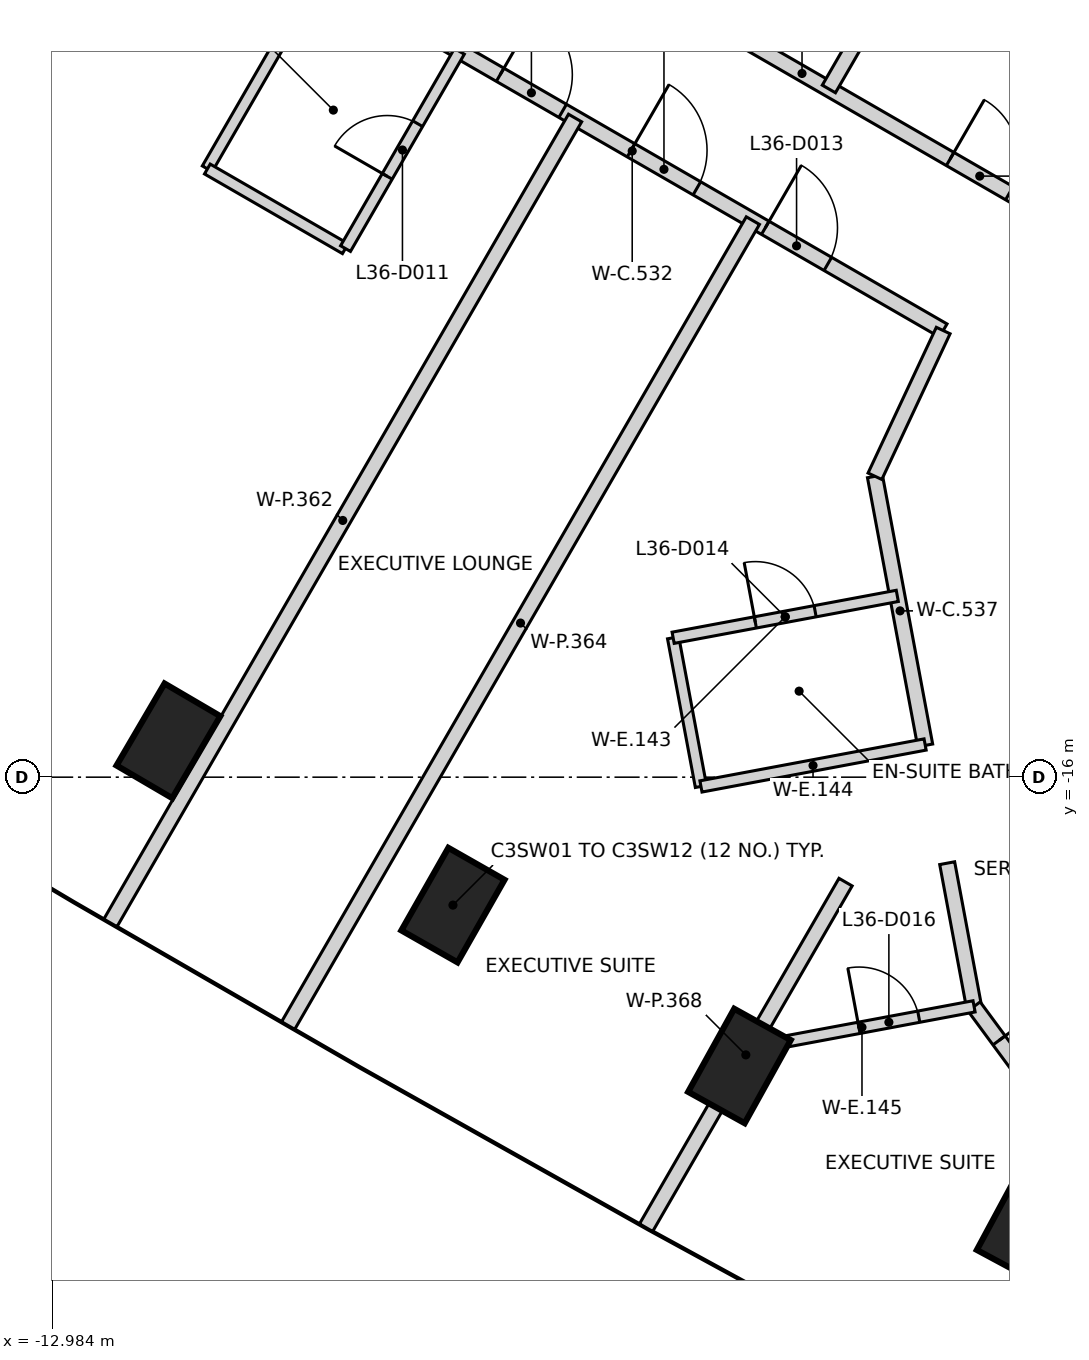
"""IFC4 building model, lengths in metres.
Left out: names, types, materials, properties, quantities, classifications, styles, units other than length and angle.
Written with IfcOpenShell. Run it as: python <this file> out.ifc"""

import sys

from ifc_helpers import new_model, si_unit, direction, frame, frame_2d, origin, origin_2d, place, context, subcontext, project, spatial, rectangle, extrude, element, fill, save


model = new_model("IFC4")
c1 = context("Model", 3, precision=1e-05, world=origin(), true_north=direction((0.0, 1.0)))
c2 = subcontext(c1, "Body", "Model", "MODEL_VIEW")
j1 = project(units=[si_unit("LENGTHUNIT", "METRE"), si_unit("PLANEANGLEUNIT", "RADIAN")], contexts=[c1])
p1 = place(None, origin())
s1 = spatial("IfcSite", under=j1, at=p1, CompositionType="ELEMENT")
p2 = place(p1, origin())
s2 = spatial("IfcBuilding", under=s1, at=p2, CompositionType="ELEMENT")
p3 = place(p2, frame((0.0, 0.0, 146.8)))
s3 = spatial("IfcBuildingStorey", under=s2, at=p3, CompositionType="ELEMENT", Elevation=146.8)
for number, where, z_axis, x_axis in (
    (1, (-11.457, -15.522, -0.4), (0.0, 0.0, 1.0), (0.505, 0.863, 0.0)),
    (2, (-7.714, -17.683, -0.4), (0.0, 0.0, 1.0), (0.495, 0.869, 0.0)),
    (3, (-3.945, -19.8, -0.4), (0.0, 0.0, 1.0), (0.485, 0.875, 0.0)),
    (4, (-0.151, -21.871, -0.4), (0.0, 0.0, 1.0), (0.474, 0.881, 0.0)),
):
    element("IfcColumn", number, at=place(p3, frame(where, z_axis=z_axis, x_axis=x_axis)), inside=s3, PredefinedType="COLUMN", context=c2, shape_type="SweptSolid", body=[
        extrude(rectangle(XDim=1.25, YDim=0.85, at=origin_2d()), origin(), (0.0, 0.0, 1.0), 3.6),
    ])
p4 = place(p3, frame((-9.447, -5.4, 0.0), z_axis=(0.0, 0.0, 1.0), x_axis=(0.866101262146, -0.49986858644, 0.0)))
e5 = element("IfcWall", 5, at=p4, inside=s3, PredefinedType="PARTITIONING", context=c2, shape_type="SweptSolid", body=[
    extrude(rectangle(XDim=9.449, YDim=0.2, at=frame_2d((4.724, 0.0))), origin(), (0.0, 0.0, 1.0), 3.2),
])
p5 = place(p4, frame((2.718, 0.0, 0.0)))
e6 = element("IfcOpeningElement", 6, at=p5, cuts=e5, PredefinedType="OPENING", context=c2, shape_type="SweptSolid", body=[
    extrude(rectangle(XDim=0.95, YDim=2.1, at=frame_2d((0.475, 1.05))), frame((0.0, 0.11, 0.0), z_axis=(0.0, -1.0, 0.0), x_axis=(1.0, 0.0, 0.0)), (0.0, 0.0, 1.0), 0.22),
])
p6 = place(p4, frame((4.707, 0.0, 0.0)))
e7 = element("IfcOpeningElement", 7, at=p6, cuts=e5, PredefinedType="OPENING", context=c2, shape_type="SweptSolid", body=[
    extrude(rectangle(XDim=1.0, YDim=2.1, at=frame_2d((0.5, 1.05))), frame((0.0, 0.11, 0.0), z_axis=(0.0, -1.0, 0.0), x_axis=(1.0, 0.0, 0.0)), (0.0, 0.0, 1.0), 0.22),
])
p7 = place(p4, frame((6.746, 0.0, 0.0)))
e8 = element("IfcOpeningElement", 8, at=p7, cuts=e5, PredefinedType="OPENING", context=c2, shape_type="SweptSolid", body=[
    extrude(rectangle(XDim=0.95, YDim=2.1, at=frame_2d((0.475, 1.05))), frame((0.0, 0.11, 0.0), z_axis=(0.0, -1.0, 0.0), x_axis=(1.0, 0.0, 0.0)), (0.0, 0.0, 1.0), 0.22),
])
p8 = place(p3, frame((-7.455, -4.24, 0.0), z_axis=(0.0, 0.0, 1.0), x_axis=(0.866015783746, -0.500016662025, 0.0)))
e9 = element("IfcWall", 9, at=p8, inside=s3, PredefinedType="PARTITIONING", context=c2, shape_type="SweptSolid", body=[
    extrude(rectangle(XDim=10.009, YDim=0.2, at=frame_2d((5.004, 0.0))), origin(), (0.0, 0.0, 1.0), 3.2),
])
p9 = place(p8, frame((2.262, 0.0, 0.0)))
e10 = element("IfcOpeningElement", 10, at=p9, cuts=e9, PredefinedType="OPENING", context=c2, shape_type="SweptSolid", body=[
    extrude(rectangle(XDim=0.9, YDim=2.1, at=frame_2d((0.45, 1.05))), frame((0.0, 0.11, 0.0), z_axis=(0.0, -1.0, 0.0), x_axis=(1.0, 0.0, 0.0)), (0.0, 0.0, 1.0), 0.22),
])
p10 = place(p8, frame((7.254, 0.0, 0.0)))
e11 = element("IfcOpeningElement", 11, at=p10, cuts=e9, PredefinedType="OPENING", context=c2, shape_type="SweptSolid", body=[
    extrude(rectangle(XDim=0.9, YDim=2.1, at=frame_2d((0.45, 1.05))), frame((0.0, 0.11, 0.0), z_axis=(0.0, -1.0, 0.0), x_axis=(1.0, 0.0, 0.0)), (0.0, 0.0, 1.0), 0.22),
])
p11 = place(p3, frame((-2.162, -12.042, 0.0), z_axis=(0.0, 0.0, 1.0), x_axis=(0.183572226488, -0.983006224631, 0.0)))
e12 = element("IfcWall", 12, at=p11, inside=s3, PredefinedType="PARTITIONING", context=c2, shape_type="SweptSolid", body=[
    extrude(rectangle(XDim=3.602, YDim=0.2, at=frame_2d((1.801, 0.0))), origin(), (0.0, 0.0, 1.0), 3.2),
])
p12 = place(p3, frame((-2.162, -12.041, 0.0), z_axis=(0.0, 0.0, 1.0), x_axis=(0.424280226728, 0.905530943264, 0.0)))
e13 = element("IfcWall", 13, at=p12, inside=s3, PredefinedType="PARTITIONING", context=c2, shape_type="SweptSolid", body=[
    extrude(rectangle(XDim=2.117, YDim=0.2, at=frame_2d((1.059, 0.0))), origin(), (0.0, 0.0, 1.0), 3.2),
])
p13 = place(p3, frame((-1.212, -17.131, 0.0), z_axis=(0.0, 0.0, 1.0), x_axis=(0.183680924698, -0.982985919483, 0.0)))
e14 = element("IfcWall", 14, at=p13, inside=s3, PredefinedType="PARTITIONING", context=c2, shape_type="SweptSolid", body=[
    extrude(rectangle(XDim=1.917, YDim=0.2, at=frame_2d((0.958, 0.0))), origin(), (0.0, 0.0, 1.0), 3.2),
])
p14 = place(p3, frame((-0.858, -19.016, 0.0), z_axis=(0.0, 0.0, 1.0), x_axis=(0.593123867414, -0.805111220829, 0.0)))
e15 = element("IfcWall", 15, at=p14, inside=s3, PredefinedType="PARTITIONING", context=c2, shape_type="SweptSolid", body=[
    extrude(rectangle(XDim=2.77, YDim=0.2, at=frame_2d((1.385, 0.0))), origin(), (0.0, 0.0, 1.0), 3.2),
])
p15 = place(p14, frame((0.555, 0.0, 0.0)))
e16 = element("IfcOpeningElement", 16, at=p15, cuts=e15, PredefinedType="OPENING", context=c2, shape_type="SweptSolid", body=[
    extrude(rectangle(XDim=0.95, YDim=2.1, at=frame_2d((0.475, 1.05))), frame((0.0, 0.11, 0.0), z_axis=(0.0, -1.0, 0.0), x_axis=(1.0, 0.0, 0.0)), (0.0, 0.0, 1.0), 0.22),
])
p16 = place(p3, frame((-12.22, -17.917, 0.0), z_axis=(0.0, 0.0, 1.0), x_axis=(0.499963860175, 0.866046268117, 0.0)))
e17 = element("IfcWall", 17, at=p16, inside=s3, PredefinedType="PARTITIONING", context=c2, shape_type="SweptSolid", body=[
    extrude(rectangle(XDim=12.227, YDim=0.2, at=frame_2d((6.114, 0.0))), origin(), (0.0, 0.0, 1.0), 2.3),
])
p17 = place(p3, frame((-9.882, -19.267, 0.0), z_axis=(0.0, 0.0, 1.0), x_axis=(0.499993811829, 0.866028976497, 0.0)))
e18 = element("IfcWall", 18, at=p17, inside=s3, PredefinedType="PARTITIONING", context=c2, shape_type="SweptSolid", body=[
    extrude(rectangle(XDim=12.227, YDim=0.2, at=frame_2d((6.114, 0.0))), origin(), (0.0, 0.0, 1.0), 2.3),
])
p18 = place(p3, frame((-6.155, -1.989, 0.0), z_axis=(0.0, 0.0, 1.0), x_axis=(0.866009062299, -0.500028303215, 0.0)))
e19 = element("IfcWall", 19, at=p18, inside=s3, PredefinedType="PARTITIONING", context=c2, shape_type="SweptSolid", body=[
    extrude(rectangle(XDim=10.802, YDim=0.2, at=frame_2d((5.401, 0.0))), origin(), (0.0, 0.0, 1.0), 2.3),
])
p19 = place(p3, frame((-5.173, -21.926, 0.0), z_axis=(0.0, 0.0, 1.0), x_axis=(0.499941227542, 0.86605933342, 0.0)))
e20 = element("IfcWall", 20, at=p19, inside=s3, PredefinedType="PARTITIONING", context=c2, shape_type="SweptSolid", body=[
    extrude(rectangle(XDim=5.249, YDim=0.2, at=frame_2d((2.625, 0.0))), origin(), (0.0, 0.0, 1.0), 3.2),
])
p20 = place(p3, frame((-2.768, -6.946, 0.0), z_axis=(0.0, 0.0, 1.0), x_axis=(0.500017832597, 0.866015107885, 0.0)))
e21 = element("IfcWall", 21, at=p20, inside=s3, PredefinedType="PARTITIONING", context=c2, shape_type="SweptSolid", body=[
    extrude(rectangle(XDim=2.6, YDim=0.2, at=frame_2d((1.3, 0.0))), origin(), (0.0, 0.0, 1.0), 2.3),
])
p21 = place(p3, frame((-0.425, -24.505, 0.0), z_axis=(0.0, 0.0, 1.0), x_axis=(0.499915194772, 0.86607436057, 0.0)))
e22 = element("IfcWall", 22, at=p21, inside=s3, PredefinedType="PARTITIONING", context=c2, shape_type="SweptSolid", body=[
    extrude(rectangle(XDim=2.997, YDim=0.2, at=frame_2d((1.499, 0.0))), origin(), (0.0, 0.0, 1.0), 2.3),
])
p22 = place(p3, frame((-10.946, -7.996, 0.0), z_axis=(0.0, 0.0, 1.0), x_axis=(0.500027927039, 0.866009279501, 0.0)))
e23 = element("IfcWall", 23, at=p22, inside=s3, PredefinedType="PARTITIONING", context=c2, shape_type="SweptSolid", body=[
    extrude(rectangle(XDim=2.998, YDim=0.15, at=frame_2d((1.499, 0.0))), origin(), (0.0, 0.0, 1.0), 3.2),
])
p23 = place(p3, frame((-10.945, -7.999, 0.0), z_axis=(0.0, 0.0, 1.0), x_axis=(0.866005190944, -0.500035008033, 0.0)))
e24 = element("IfcWall", 24, at=p23, inside=s3, PredefinedType="PARTITIONING", context=c2, shape_type="SweptSolid", body=[
    extrude(rectangle(XDim=2.096, YDim=0.15, at=frame_2d((1.048, 0.0))), origin(), (0.0, 0.0, 1.0), 3.2),
])
p24 = place(p3, frame((-9.127, -9.046, 0.0), z_axis=(0.0, 0.0, 1.0), x_axis=(0.499959910729, 0.866048548099, 0.0)))
e25 = element("IfcWall", 25, at=p24, inside=s3, PredefinedType="PARTITIONING", context=c2, shape_type="SweptSolid", body=[
    extrude(rectangle(XDim=2.996, YDim=0.15, at=frame_2d((1.498, 0.0))), origin(), (0.0, 0.0, 1.0), 3.2),
])
p25 = place(p24, frame((1.098, 0.0, 0.0)))
e26 = element("IfcOpeningElement", 26, at=p25, cuts=e25, PredefinedType="OPENING", context=c2, shape_type="SweptSolid", body=[
    extrude(rectangle(XDim=0.8, YDim=2.1, at=frame_2d((0.4, 1.05))), frame((0.0, 0.085, 0.0), z_axis=(0.0, -1.0, 0.0), x_axis=(1.0, 0.0, 0.0)), (0.0, 0.0, 1.0), 0.17),
])
p26 = place(p3, frame((-4.817, -14.166, 0.0), z_axis=(0.0, 0.0, 1.0), x_axis=(0.183903339385, -0.982944332993, 0.0)))
e27 = element("IfcWall", 27, at=p26, inside=s3, PredefinedType="PARTITIONING", context=c2, shape_type="SweptSolid", body=[
    extrude(rectangle(XDim=1.99, YDim=0.15, at=frame_2d((0.995, 0.0))), origin(), (0.0, 0.0, 1.0), 3.2),
])
p27 = place(p3, frame((-4.817, -14.166, 0.0), z_axis=(0.0, 0.0, 1.0), x_axis=(0.982987155193, 0.183674311555, 0.0)))
e28 = element("IfcWall", 28, at=p27, inside=s3, PredefinedType="PARTITIONING", context=c2, shape_type="SweptSolid", body=[
    extrude(rectangle(XDim=3.0, YDim=0.15, at=frame_2d((1.5, 0.0))), origin(), (0.0, 0.0, 1.0), 3.2),
])
p28 = place(p27, frame((1.1, 0.0, 0.0)))
e29 = element("IfcOpeningElement", 29, at=p28, cuts=e28, PredefinedType="OPENING", context=c2, shape_type="SweptSolid", body=[
    extrude(rectangle(XDim=0.8, YDim=2.1, at=frame_2d((0.4, 1.05))), frame((0.0, 0.085, 0.0), z_axis=(0.0, -1.0, 0.0), x_axis=(1.0, 0.0, 0.0)), (0.0, 0.0, 1.0), 0.17),
])
p29 = place(p3, frame((-4.451, -16.122, 0.0), z_axis=(0.0, 0.0, 1.0), x_axis=(0.982928336035, 0.18398882091, 0.0)))
e30 = element("IfcWall", 30, at=p29, inside=s3, PredefinedType="PARTITIONING", context=c2, shape_type="SweptSolid", body=[
    extrude(rectangle(XDim=3.0, YDim=0.15, at=frame_2d((1.5, 0.0))), origin(), (0.0, 0.0, 1.0), 3.2),
])
p30 = place(p3, frame((-3.807, -19.566, 0.0), z_axis=(0.0, 0.0, 1.0), x_axis=(0.982987155193, 0.183674311555, 0.0)))
e31 = element("IfcWall", 31, at=p30, inside=s3, PredefinedType="PARTITIONING", context=c2, shape_type="SweptSolid", body=[
    extrude(rectangle(XDim=3.0, YDim=0.15, at=frame_2d((1.5, 0.0))), origin(), (0.0, 0.0, 1.0), 3.2),
])
p31 = place(p30, frame((1.46, 0.0, 0.0)))
e32 = element("IfcOpeningElement", 32, at=p31, cuts=e31, PredefinedType="OPENING", context=c2, shape_type="SweptSolid", body=[
    extrude(rectangle(XDim=0.8, YDim=2.1, at=frame_2d((0.4, 1.05))), frame((0.0, 0.085, 0.0), z_axis=(0.0, -1.0, 0.0), x_axis=(1.0, 0.0, 0.0)), (0.0, 0.0, 1.0), 0.17),
])
p32 = place(p5, frame((0.95, 0.0, 0.0), z_axis=(0.0, 0.0, 1.0), x_axis=(-1.0, 0.0, 0.0)))
e33 = element("IfcDoor", 33, at=p32, inside=s3, OperationType="SINGLE_SWING_LEFT", PredefinedType="DOOR", context=c2, shape_type="SweptSolid", body=[
    extrude(rectangle(XDim=0.95, YDim=2.1, at=frame_2d((0.475, 1.05))), frame((0.0, 0.025, 0.0), z_axis=(0.0, -1.0, 0.0), x_axis=(1.0, 0.0, 0.0)), (0.0, 0.0, 1.0), 0.05),
])
fill(e6, e33)
p33 = place(p25, origin())
e34 = element("IfcDoor", 34, at=p33, inside=s3, OperationType="SINGLE_SWING_LEFT", PredefinedType="DOOR", context=c2, shape_type="SweptSolid", body=[
    extrude(rectangle(XDim=0.8, YDim=2.1, at=frame_2d((0.4, 1.05))), frame((0.0, 0.025, 0.0), z_axis=(0.0, -1.0, 0.0), x_axis=(1.0, 0.0, 0.0)), (0.0, 0.0, 1.0), 0.05),
])
fill(e26, e34)
p34 = place(p6, frame((1.0, 0.0, 0.0), z_axis=(0.0, 0.0, 1.0), x_axis=(-1.0, 0.0, 0.0)))
e35 = element("IfcDoor", 35, at=p34, inside=s3, OperationType="SINGLE_SWING_LEFT", PredefinedType="DOOR", context=c2, shape_type="SweptSolid", body=[
    extrude(rectangle(XDim=1.0, YDim=2.1, at=frame_2d((0.5, 1.05))), frame((0.0, 0.025, 0.0), z_axis=(0.0, -1.0, 0.0), x_axis=(1.0, 0.0, 0.0)), (0.0, 0.0, 1.0), 0.05),
])
fill(e7, e35)
p35 = place(p7, frame((0.95, 0.0, 0.0), z_axis=(0.0, 0.0, 1.0), x_axis=(-1.0, 0.0, 0.0)))
e36 = element("IfcDoor", 36, at=p35, inside=s3, OperationType="SINGLE_SWING_LEFT", PredefinedType="DOOR", context=c2, shape_type="SweptSolid", body=[
    extrude(rectangle(XDim=0.95, YDim=2.1, at=frame_2d((0.475, 1.05))), frame((0.0, 0.025, 0.0), z_axis=(0.0, -1.0, 0.0), x_axis=(1.0, 0.0, 0.0)), (0.0, 0.0, 1.0), 0.05),
])
fill(e8, e36)
p36 = place(p28, frame((0.8, 0.0, 0.0), z_axis=(0.0, 0.0, 1.0), x_axis=(-1.0, 0.0, 0.0)))
e37 = element("IfcDoor", 37, at=p36, inside=s3, OperationType="SINGLE_SWING_LEFT", PredefinedType="DOOR", context=c2, shape_type="SweptSolid", body=[
    extrude(rectangle(XDim=0.8, YDim=2.1, at=frame_2d((0.4, 1.05))), frame((0.0, 0.025, 0.0), z_axis=(0.0, -1.0, 0.0), x_axis=(1.0, 0.0, 0.0)), (0.0, 0.0, 1.0), 0.05),
])
fill(e29, e37)
p37 = place(p15, frame((0.95, 0.0, 0.0), z_axis=(0.0, 0.0, 1.0), x_axis=(-1.0, 0.0, 0.0)))
e38 = element("IfcDoor", 38, at=p37, inside=s3, OperationType="SINGLE_SWING_LEFT", PredefinedType="DOOR", context=c2, shape_type="SweptSolid", body=[
    extrude(rectangle(XDim=0.95, YDim=2.1, at=frame_2d((0.475, 1.05))), frame((0.0, 0.025, 0.0), z_axis=(0.0, -1.0, 0.0), x_axis=(1.0, 0.0, 0.0)), (0.0, 0.0, 1.0), 0.05),
])
fill(e16, e38)
p38 = place(p31, frame((0.8, 0.0, 0.0), z_axis=(0.0, 0.0, 1.0), x_axis=(-1.0, 0.0, 0.0)))
e39 = element("IfcDoor", 39, at=p38, inside=s3, OperationType="SINGLE_SWING_LEFT", PredefinedType="DOOR", context=c2, shape_type="SweptSolid", body=[
    extrude(rectangle(XDim=0.8, YDim=2.1, at=frame_2d((0.4, 1.05))), frame((0.0, 0.025, 0.0), z_axis=(0.0, -1.0, 0.0), x_axis=(1.0, 0.0, 0.0)), (0.0, 0.0, 1.0), 0.05),
])
fill(e32, e39)
p39 = place(p10, origin())
e40 = element("IfcDoor", 40, at=p39, inside=s3, OperationType="SINGLE_SWING_LEFT", PredefinedType="DOOR", context=c2, shape_type="SweptSolid", body=[
    extrude(rectangle(XDim=0.9, YDim=2.1, at=frame_2d((0.45, 1.05))), frame((0.0, 0.025, 0.0), z_axis=(0.0, -1.0, 0.0), x_axis=(1.0, 0.0, 0.0)), (0.0, 0.0, 1.0), 0.05),
])
fill(e11, e40)
save(model, sys.argv[1])
